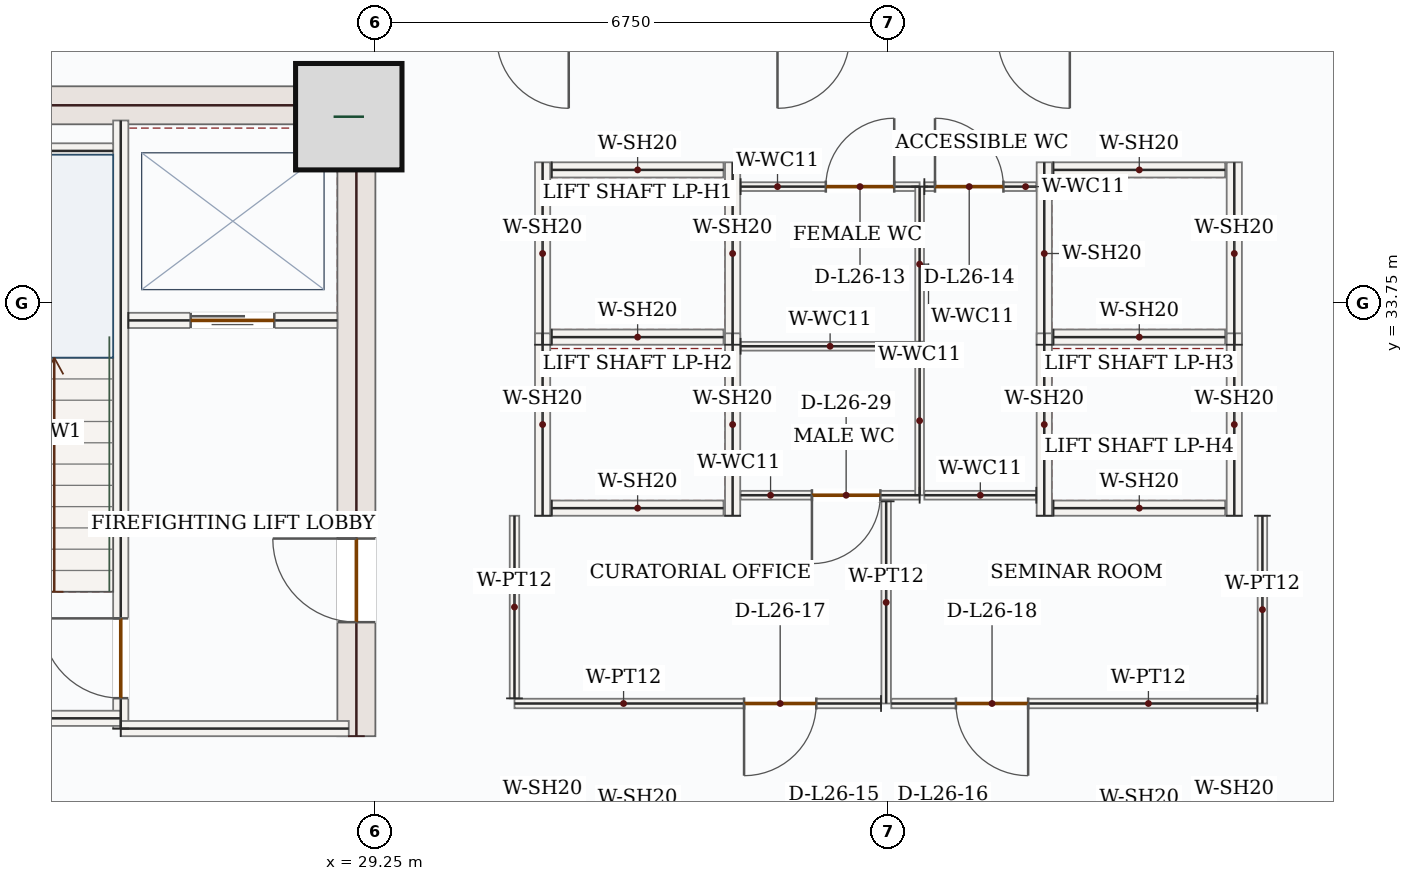
"""IFC4 building model, lengths in metres.
Left out: names, types, materials, properties, quantities, classifications, styles, units other than length and angle.
Written with IfcOpenShell. Run it as: python <this file> out.ifc"""

import sys

from ifc_helpers import new_model, si_unit, direction, frame, frame_2d, origin, origin_2d, place, context, subcontext, project, spatial, rectangle, extrude, source, transform, mapped, element, fill, save


model = new_model("IFC4")
c1 = context("Model", 3, precision=1e-05, world=origin(), true_north=direction((0.0, 1.0)))
c2 = subcontext(c1, "Body", "Model", "MODEL_VIEW")
j1 = project(units=[si_unit("LENGTHUNIT", "METRE"), si_unit("PLANEANGLEUNIT", "RADIAN")], contexts=[c1])
p1 = place(None, origin())
s1 = spatial("IfcSite", under=j1, at=p1, CompositionType="ELEMENT")
p2 = place(p1, origin())
s2 = spatial("IfcBuilding", under=s1, at=p2, CompositionType="ELEMENT")
p3 = place(p2, frame((0.0, 0.0, 117.3)))
s3 = spatial("IfcBuildingStorey", under=s2, at=p3, CompositionType="ELEMENT", Elevation=117.3)
p4 = place(p3, frame((29.0, 28.05, 0.0), z_axis=(0.0, 0.0, 1.0), x_axis=(0.0, 1.0, 0.0)))
e1 = element("IfcWall", 1, at=p4, inside=s3, PredefinedType="SHEAR", context=c2, shape_type="SweptSolid", body=[
    extrude(rectangle(XDim=8.55, YDim=0.5, at=frame_2d((4.275, 0.0))), origin(), (0.0, 0.0, 1.0), 3.95),
])
p5 = place(p4, frame((1.5, 0.0, 0.0)))
e2 = element("IfcOpeningElement", 2, at=p5, cuts=e1, PredefinedType="OPENING", context=c2, shape_type="SweptSolid", body=[
    extrude(rectangle(XDim=1.1, YDim=2.2, at=frame_2d((0.55, 1.1))), frame((0.0, 0.26, 0.0), z_axis=(0.0, -1.0, 0.0), x_axis=(1.0, 0.0, 0.0)), (0.0, 0.0, 1.0), 0.52),
])
m1 = source(origin(), c2, "Body", "SweptSolid", [
    extrude(rectangle(XDim=7.0, YDim=0.5, at=frame_2d((3.5, 0.0))), origin(), (0.0, 0.0, 1.0), 3.95),
])
p6 = place(p3, frame((21.75, 36.35, 0.0), z_axis=(0.0, 0.0, 1.0), x_axis=(1.0, 0.0, 0.0)))
e3 = element("IfcWall", 3, at=p6, inside=s3, PredefinedType="SHEAR", context=c2, shape_type="MappedRepresentation", body=[
    mapped(m1, transform((0.0, 0.0, 0.0), x_axis=(1.0, 0.0, 0.0), y_axis=(0.0, 1.0, 0.0), z_axis=(0.0, 0.0, 1.0), scale=1.0)),
])
m2 = source(origin(), c2, "Body", "SweptSolid", [
    extrude(rectangle(XDim=1.4, YDim=1.4, at=origin_2d()), origin(), (0.0, 0.0, 1.0), 4.2),
])
p7 = place(p3, frame((28.9, 36.2, 0.0), z_axis=(0.0, 0.0, 1.0), x_axis=(1.0, 0.0, 0.0)))
e4 = element("IfcColumn", 4, at=p7, inside=s3, PredefinedType="COLUMN", context=c2, shape_type="MappedRepresentation", body=[
    mapped(m2, transform((0.0, 0.0, 0.0), x_axis=(1.0, 0.0, 0.0), y_axis=(0.0, 1.0, 0.0), z_axis=(0.0, 0.0, 1.0), scale=1.0)),
])
p8 = place(p3, frame((25.9, 28.15, 0.0), z_axis=(0.0, 0.0, 1.0), x_axis=(0.0, 1.0, 0.0)))
e5 = element("IfcWall", 5, at=p8, inside=s3, PredefinedType="SOLIDWALL", context=c2, shape_type="SweptSolid", body=[
    extrude(rectangle(XDim=8.0, YDim=0.2, at=frame_2d((4.0, 0.0))), origin(), (0.0, 0.0, 1.0), 3.95),
])
p9 = place(p8, frame((0.4, 0.0, 0.0)))
e6 = element("IfcOpeningElement", 6, at=p9, cuts=e5, PredefinedType="OPENING", context=c2, shape_type="SweptSolid", body=[
    extrude(rectangle(XDim=1.05, YDim=2.15, at=frame_2d((0.525, 1.075))), frame((0.0, 0.11, 0.0), z_axis=(0.0, -1.0, 0.0), x_axis=(1.0, 0.0, 0.0)), (0.0, 0.0, 1.0), 0.22),
])
m3 = source(origin(), c2, "Body", "SweptSolid", [
    extrude(rectangle(XDim=4.25, YDim=0.2, at=frame_2d((2.125, 0.0))), origin(), (0.0, 0.0, 1.0), 3.95),
])
p10 = place(p3, frame((21.65, 28.285, 0.0), z_axis=(0.0, 0.0, 1.0), x_axis=(1.0, 0.0, 0.0)))
e7 = element("IfcWall", 7, at=p10, inside=s3, PredefinedType="SOLIDWALL", context=c2, shape_type="MappedRepresentation", body=[
    mapped(m3, transform((0.0, 0.0, 0.0), x_axis=(1.0, 0.0, 0.0), y_axis=(0.0, 1.0, 0.0), z_axis=(0.0, 0.0, 1.0), scale=1.0)),
])
m4 = source(origin(), c2, "Body", "SweptSolid", [
    extrude(rectangle(XDim=3.0, YDim=0.2, at=frame_2d((1.5, 0.0))), origin(), (0.0, 0.0, 1.0), 3.95),
])
p11 = place(p3, frame((25.9, 28.15, 0.0), z_axis=(0.0, 0.0, 1.0), x_axis=(1.0, 0.0, 0.0)))
e8 = element("IfcWall", 8, at=p11, inside=s3, PredefinedType="SOLIDWALL", context=c2, shape_type="MappedRepresentation", body=[
    mapped(m4, transform((0.0, 0.0, 0.0), x_axis=(1.0, 0.0, 0.0), y_axis=(0.0, 1.0, 0.0), z_axis=(0.0, 0.0, 1.0), scale=1.0)),
])
m5 = source(origin(), c2, "Body", "SweptSolid", [
    extrude(rectangle(XDim=3.25, YDim=0.2, at=frame_2d((1.625, 0.0))), origin(), (0.0, 0.0, 1.0), 3.95),
])
p12 = place(p3, frame((22.55, 35.75, 0.0), z_axis=(0.0, 0.0, 1.0), x_axis=(1.0, 0.0, 0.0)))
e9 = element("IfcWall", 9, at=p12, inside=s3, PredefinedType="SOLIDWALL", context=c2, shape_type="MappedRepresentation", body=[
    mapped(m5, transform((0.0, 0.0, 0.0), x_axis=(1.0, 0.0, 0.0), y_axis=(0.0, 1.0, 0.0), z_axis=(0.0, 0.0, 1.0), scale=1.0)),
])
p13 = place(p3, frame((26.0, 33.52, 0.0), z_axis=(0.0, 0.0, 1.0), x_axis=(1.0, 0.0, 0.0)))
e10 = element("IfcWall", 10, at=p13, inside=s3, PredefinedType="SOLIDWALL", context=c2, shape_type="SweptSolid", body=[
    extrude(rectangle(XDim=2.75, YDim=0.2, at=frame_2d((1.375, 0.0))), origin(), (0.0, 0.0, 1.0), 3.95),
])
p14 = place(p13, frame((0.82, 0.0, 0.0)))
e11 = element("IfcOpeningElement", 11, at=p14, cuts=e10, PredefinedType="OPENING", context=c2, shape_type="SweptSolid", body=[
    extrude(rectangle(XDim=1.1, YDim=2.15, at=frame_2d((0.55, 1.075))), frame((0.0, 0.11, 0.0), z_axis=(0.0, -1.0, 0.0), x_axis=(1.0, 0.0, 0.0)), (0.0, 0.0, 1.0), 0.22),
])
m6 = source(origin(), c2, "Body", "SweptSolid", [
    extrude(rectangle(XDim=2.4, YDim=0.2, at=frame_2d((1.2, 0.0))), origin(), (0.0, 0.0, 1.0), 3.95),
])
for number, where, z_axis, x_axis in (
    (12, (31.45, 33.2, 0.0), (0.0, 0.0, 1.0), (0.0, 1.0, 0.0)),
    (13, (33.95, 33.2, 0.0), (0.0, 0.0, 1.0), (0.0, 1.0, 0.0)),
):
    element("IfcWall", number, at=place(p3, frame(where, z_axis=z_axis, x_axis=x_axis)), inside=s3, PredefinedType="SOLIDWALL", context=c2, shape_type="MappedRepresentation", body=[
        mapped(m6, transform((0.0, 0.0, 0.0), x_axis=(1.0, 0.0, 0.0), y_axis=(0.0, 1.0, 0.0), z_axis=(0.0, 0.0, 1.0), scale=1.0)),
    ])
m7 = source(origin(), c2, "Body", "SweptSolid", [
    extrude(rectangle(XDim=2.26, YDim=0.2, at=frame_2d((1.13, 0.0))), origin(), (0.0, 0.0, 1.0), 3.95),
])
for number, where, z_axis, x_axis in (
    (14, (31.57, 33.3, 0.0), (0.0, 0.0, 1.0), (1.0, 0.0, 0.0)),
    (15, (31.57, 35.5, 0.0), (0.0, 0.0, 1.0), (1.0, 0.0, 0.0)),
):
    element("IfcWall", number, at=place(p3, frame(where, z_axis=z_axis, x_axis=x_axis)), inside=s3, PredefinedType="SOLIDWALL", context=c2, shape_type="MappedRepresentation", body=[
        mapped(m7, transform((0.0, 0.0, 0.0), x_axis=(1.0, 0.0, 0.0), y_axis=(0.0, 1.0, 0.0), z_axis=(0.0, 0.0, 1.0), scale=1.0)),
    ])
for number, where, z_axis, x_axis in (
    (16, (31.45, 30.95, 0.0), (0.0, 0.0, 1.0), (0.0, 1.0, 0.0)),
    (17, (33.95, 30.95, 0.0), (0.0, 0.0, 1.0), (0.0, 1.0, 0.0)),
):
    element("IfcWall", number, at=place(p3, frame(where, z_axis=z_axis, x_axis=x_axis)), inside=s3, PredefinedType="SOLIDWALL", context=c2, shape_type="MappedRepresentation", body=[
        mapped(m6, transform((0.0, 0.0, 0.0), x_axis=(1.0, 0.0, 0.0), y_axis=(0.0, 1.0, 0.0), z_axis=(0.0, 0.0, 1.0), scale=1.0)),
    ])
p15 = place(p3, frame((31.57, 31.05, 0.0), z_axis=(0.0, 0.0, 1.0), x_axis=(1.0, 0.0, 0.0)))
e18 = element("IfcWall", 18, at=p15, inside=s3, PredefinedType="SOLIDWALL", context=c2, shape_type="MappedRepresentation", body=[
    mapped(m7, transform((0.0, 0.0, 0.0), x_axis=(1.0, 0.0, 0.0), y_axis=(0.0, 1.0, 0.0), z_axis=(0.0, 0.0, 1.0), scale=1.0)),
])
for number, where, z_axis, x_axis in (
    (19, (38.05, 33.2, 0.0), (0.0, 0.0, 1.0), (0.0, 1.0, 0.0)),
    (20, (40.55, 33.2, 0.0), (0.0, 0.0, 1.0), (0.0, 1.0, 0.0)),
):
    element("IfcWall", number, at=place(p3, frame(where, z_axis=z_axis, x_axis=x_axis)), inside=s3, PredefinedType="SOLIDWALL", context=c2, shape_type="MappedRepresentation", body=[
        mapped(m6, transform((0.0, 0.0, 0.0), x_axis=(1.0, 0.0, 0.0), y_axis=(0.0, 1.0, 0.0), z_axis=(0.0, 0.0, 1.0), scale=1.0)),
    ])
for number, where, z_axis, x_axis in (
    (21, (38.17, 33.3, 0.0), (0.0, 0.0, 1.0), (1.0, 0.0, 0.0)),
    (22, (38.17, 35.5, 0.0), (0.0, 0.0, 1.0), (1.0, 0.0, 0.0)),
):
    element("IfcWall", number, at=place(p3, frame(where, z_axis=z_axis, x_axis=x_axis)), inside=s3, PredefinedType="SOLIDWALL", context=c2, shape_type="MappedRepresentation", body=[
        mapped(m7, transform((0.0, 0.0, 0.0), x_axis=(1.0, 0.0, 0.0), y_axis=(0.0, 1.0, 0.0), z_axis=(0.0, 0.0, 1.0), scale=1.0)),
    ])
for number, where, z_axis, x_axis in (
    (23, (38.05, 30.95, 0.0), (0.0, 0.0, 1.0), (0.0, 1.0, 0.0)),
    (24, (40.55, 30.95, 0.0), (0.0, 0.0, 1.0), (0.0, 1.0, 0.0)),
):
    element("IfcWall", number, at=place(p3, frame(where, z_axis=z_axis, x_axis=x_axis)), inside=s3, PredefinedType="SOLIDWALL", context=c2, shape_type="MappedRepresentation", body=[
        mapped(m6, transform((0.0, 0.0, 0.0), x_axis=(1.0, 0.0, 0.0), y_axis=(0.0, 1.0, 0.0), z_axis=(0.0, 0.0, 1.0), scale=1.0)),
    ])
p16 = place(p3, frame((38.17, 31.05, 0.0), z_axis=(0.0, 0.0, 1.0), x_axis=(1.0, 0.0, 0.0)))
e25 = element("IfcWall", 25, at=p16, inside=s3, PredefinedType="SOLIDWALL", context=c2, shape_type="MappedRepresentation", body=[
    mapped(m7, transform((0.0, 0.0, 0.0), x_axis=(1.0, 0.0, 0.0), y_axis=(0.0, 1.0, 0.0), z_axis=(0.0, 0.0, 1.0), scale=1.0)),
])
p17 = place(p3, frame((36.41, 31.22, 0.0), z_axis=(0.0, 0.0, 1.0), x_axis=(-1.0, 0.0, 0.0)))
e26 = element("IfcWall", 26, at=p17, inside=s3, PredefinedType="PARTITIONING", context=c2, shape_type="SweptSolid", body=[
    extrude(rectangle(XDim=2.355, YDim=0.115, at=frame_2d((1.177, 0.0))), origin(), (0.0, 0.0, 1.0), 3.95),
])
p18 = place(p17, frame((0.517, 0.0, 0.0)))
e27 = element("IfcOpeningElement", 27, at=p18, cuts=e26, PredefinedType="OPENING", context=c2, shape_type="SweptSolid", body=[
    extrude(rectangle(XDim=0.9, YDim=2.1, at=frame_2d((0.45, 1.05))), frame((0.0, 0.067, 0.0), z_axis=(0.0, -1.0, 0.0), x_axis=(1.0, 0.0, 0.0)), (0.0, 0.0, 1.0), 0.135),
])
m8 = source(origin(), c2, "Body", "SweptSolid", [
    extrude(rectangle(XDim=2.355, YDim=0.115, at=frame_2d((1.177, 0.0))), origin(), (0.0, 0.0, 1.0), 3.95),
])
p19 = place(p3, frame((34.055, 33.18, 0.0), z_axis=(0.0, 0.0, 1.0), x_axis=(1.0, 0.0, 0.0)))
e28 = element("IfcWall", 28, at=p19, inside=s3, PredefinedType="PARTITIONING", context=c2, shape_type="MappedRepresentation", body=[
    mapped(m8, transform((0.0, 0.0, 0.0), x_axis=(1.0, 0.0, 0.0), y_axis=(0.0, 1.0, 0.0), z_axis=(0.0, 0.0, 1.0), scale=1.0)),
])
m9 = source(origin(), c2, "Body", "SweptSolid", [
    extrude(rectangle(XDim=1.96, YDim=0.115, at=frame_2d((0.98, 0.0))), origin(), (0.0, 0.0, 1.0), 3.95),
])
p20 = place(p3, frame((36.41, 33.18, 0.0), z_axis=(0.0, 0.0, 1.0), x_axis=(0.0, -1.0, 0.0)))
e29 = element("IfcWall", 29, at=p20, inside=s3, PredefinedType="PARTITIONING", context=c2, shape_type="MappedRepresentation", body=[
    mapped(m9, transform((0.0, 0.0, 0.0), x_axis=(1.0, 0.0, 0.0), y_axis=(0.0, 1.0, 0.0), z_axis=(0.0, 0.0, 1.0), scale=1.0)),
])
p21 = place(p3, frame((34.055, 35.28, 0.0), z_axis=(0.0, 0.0, 1.0), x_axis=(1.0, 0.0, 0.0)))
e30 = element("IfcWall", 30, at=p21, inside=s3, PredefinedType="PARTITIONING", context=c2, shape_type="SweptSolid", body=[
    extrude(rectangle(XDim=2.355, YDim=0.115, at=frame_2d((1.177, 0.0))), origin(), (0.0, 0.0, 1.0), 3.95),
])
p22 = place(p21, frame((1.121, 0.0, 0.0)))
e31 = element("IfcOpeningElement", 31, at=p22, cuts=e30, PredefinedType="OPENING", context=c2, shape_type="SweptSolid", body=[
    extrude(rectangle(XDim=0.9, YDim=2.1, at=frame_2d((0.45, 1.05))), frame((0.0, 0.067, 0.0), z_axis=(0.0, -1.0, 0.0), x_axis=(1.0, 0.0, 0.0)), (0.0, 0.0, 1.0), 0.135),
])
m10 = source(origin(), c2, "Body", "SweptSolid", [
    extrude(rectangle(XDim=2.04, YDim=0.115, at=frame_2d((1.02, 0.0))), origin(), (0.0, 0.0, 1.0), 3.95),
])
p23 = place(p3, frame((36.41, 35.28, 0.0), z_axis=(0.0, 0.0, 1.0), x_axis=(0.0, -1.0, 0.0)))
e32 = element("IfcWall", 32, at=p23, inside=s3, PredefinedType="PARTITIONING", context=c2, shape_type="MappedRepresentation", body=[
    mapped(m10, transform((0.0, 0.0, 0.0), x_axis=(1.0, 0.0, 0.0), y_axis=(0.0, 1.0, 0.0), z_axis=(0.0, 0.0, 1.0), scale=1.0)),
])
m11 = source(origin(), c2, "Body", "SweptSolid", [
    extrude(rectangle(XDim=1.473, YDim=0.115, at=frame_2d((0.736, 0.0))), origin(), (0.0, 0.0, 1.0), 3.95),
])
p24 = place(p3, frame((37.945, 31.22, 0.0), z_axis=(0.0, 0.0, 1.0), x_axis=(-1.0, 0.0, 0.0)))
e33 = element("IfcWall", 33, at=p24, inside=s3, PredefinedType="PARTITIONING", context=c2, shape_type="MappedRepresentation", body=[
    mapped(m11, transform((0.0, 0.0, 0.0), x_axis=(1.0, 0.0, 0.0), y_axis=(0.0, 1.0, 0.0), z_axis=(0.0, 0.0, 1.0), scale=1.0)),
])
p25 = place(p3, frame((36.472, 35.28, 0.0), z_axis=(0.0, 0.0, 1.0), x_axis=(1.0, 0.0, 0.0)))
e34 = element("IfcWall", 34, at=p25, inside=s3, PredefinedType="PARTITIONING", context=c2, shape_type="SweptSolid", body=[
    extrude(rectangle(XDim=1.473, YDim=0.115, at=frame_2d((0.736, 0.0))), origin(), (0.0, 0.0, 1.0), 3.95),
])
p26 = place(p25, frame((0.14, 0.0, 0.0)))
e35 = element("IfcOpeningElement", 35, at=p26, cuts=e34, PredefinedType="OPENING", context=c2, shape_type="SweptSolid", body=[
    extrude(rectangle(XDim=0.9, YDim=2.1, at=frame_2d((0.45, 1.05))), frame((0.0, 0.067, 0.0), z_axis=(0.0, -1.0, 0.0), x_axis=(1.0, 0.0, 0.0)), (0.0, 0.0, 1.0), 0.135),
])
m12 = source(origin(), c2, "Body", "SweptSolid", [
    extrude(rectangle(XDim=2.66, YDim=0.125, at=frame_2d((1.33, 0.0))), origin(), (0.0, 0.0, 1.0), 3.95),
])
p27 = place(p3, frame((35.97, 31.14, 0.0), z_axis=(0.0, 0.0, 1.0), x_axis=(0.0, -1.0, 0.0)))
e36 = element("IfcWall", 36, at=p27, inside=s3, PredefinedType="PARTITIONING", context=c2, shape_type="MappedRepresentation", body=[
    mapped(m12, transform((0.0, 0.0, 0.0), x_axis=(1.0, 0.0, 0.0), y_axis=(0.0, 1.0, 0.0), z_axis=(0.0, 0.0, 1.0), scale=1.0)),
])
p28 = place(p3, frame((35.903, 28.48, 0.0), z_axis=(0.0, 0.0, 1.0), x_axis=(-1.0, 0.0, 0.0)))
e37 = element("IfcWall", 37, at=p28, inside=s3, PredefinedType="PARTITIONING", context=c2, shape_type="SweptSolid", body=[
    extrude(rectangle(XDim=4.823, YDim=0.125, at=frame_2d((2.411, 0.0))), origin(), (0.0, 0.0, 1.0), 3.95),
])
p29 = place(p28, frame((0.852, 0.0, 0.0)))
e38 = element("IfcOpeningElement", 38, at=p29, cuts=e37, PredefinedType="OPENING", context=c2, shape_type="SweptSolid", body=[
    extrude(rectangle(XDim=0.95, YDim=2.15, at=frame_2d((0.475, 1.075))), frame((0.0, 0.073, 0.0), z_axis=(0.0, -1.0, 0.0), x_axis=(1.0, 0.0, 0.0)), (0.0, 0.0, 1.0), 0.145),
])
m13 = source(origin(), c2, "Body", "SweptSolid", [
    extrude(rectangle(XDim=2.402, YDim=0.125, at=frame_2d((1.201, 0.0))), origin(), (0.0, 0.0, 1.0), 3.95),
])
p30 = place(p3, frame((31.08, 28.548, 0.0), z_axis=(0.0, 0.0, 1.0), x_axis=(0.0, 1.0, 0.0)))
e39 = element("IfcWall", 39, at=p30, inside=s3, PredefinedType="PARTITIONING", context=c2, shape_type="MappedRepresentation", body=[
    mapped(m13, transform((0.0, 0.0, 0.0), x_axis=(1.0, 0.0, 0.0), y_axis=(0.0, 1.0, 0.0), z_axis=(0.0, 0.0, 1.0), scale=1.0)),
])
m14 = source(origin(), c2, "Body", "SweptSolid", [
    extrude(rectangle(XDim=2.47, YDim=0.125, at=frame_2d((1.235, 0.0))), origin(), (0.0, 0.0, 1.0), 3.95),
])
p31 = place(p3, frame((40.92, 30.95, 0.0), z_axis=(0.0, 0.0, 1.0), x_axis=(0.0, -1.0, 0.0)))
e40 = element("IfcWall", 40, at=p31, inside=s3, PredefinedType="PARTITIONING", context=c2, shape_type="MappedRepresentation", body=[
    mapped(m14, transform((0.0, 0.0, 0.0), x_axis=(1.0, 0.0, 0.0), y_axis=(0.0, 1.0, 0.0), z_axis=(0.0, 0.0, 1.0), scale=1.0)),
])
p32 = place(p3, frame((40.853, 28.48, 0.0), z_axis=(0.0, 0.0, 1.0), x_axis=(-1.0, 0.0, 0.0)))
e41 = element("IfcWall", 41, at=p32, inside=s3, PredefinedType="PARTITIONING", context=c2, shape_type="SweptSolid", body=[
    extrude(rectangle(XDim=4.815, YDim=0.125, at=frame_2d((2.407, 0.0))), origin(), (0.0, 0.0, 1.0), 3.95),
])
p33 = place(p32, frame((3.015, 0.0, 0.0)))
e42 = element("IfcOpeningElement", 42, at=p33, cuts=e41, PredefinedType="OPENING", context=c2, shape_type="SweptSolid", body=[
    extrude(rectangle(XDim=0.95, YDim=2.15, at=frame_2d((0.475, 1.075))), frame((0.0, 0.073, 0.0), z_axis=(0.0, -1.0, 0.0), x_axis=(1.0, 0.0, 0.0)), (0.0, 0.0, 1.0), 0.145),
])
m15 = source(origin(), c2, "Body", "SweptSolid", [
    extrude(rectangle(XDim=1.05, YDim=2.15, at=frame_2d((0.525, 1.075))), frame((0.0, 0.025, 0.0), z_axis=(0.0, -1.0, 0.0), x_axis=(1.0, 0.0, 0.0)), (0.0, 0.0, 1.0), 0.05),
])
p34 = place(p9, origin())
e43 = element("IfcDoor", 43, at=p34, inside=s3, OperationType="SINGLE_SWING_RIGHT", PredefinedType="DOOR", context=c2, shape_type="MappedRepresentation", body=[
    mapped(m15, transform((0.0, 0.0, 0.0), x_axis=(1.0, 0.0, 0.0), y_axis=(0.0, 1.0, 0.0), z_axis=(0.0, 0.0, 1.0), scale=1.0)),
])
fill(e6, e43)
m16 = source(origin(), c2, "Body", "SweptSolid", [
    extrude(rectangle(XDim=1.1, YDim=2.15, at=frame_2d((0.55, 1.075))), frame((0.0, 0.025, 0.0), z_axis=(0.0, -1.0, 0.0), x_axis=(1.0, 0.0, 0.0)), (0.0, 0.0, 1.0), 0.05),
])
p35 = place(p14, origin())
e44 = element("IfcDoor", 44, at=p35, inside=s3, OperationType="DOUBLE_DOOR_SLIDING", PredefinedType="DOOR", context=c2, shape_type="MappedRepresentation", body=[
    mapped(m16, transform((0.0, 0.0, 0.0), x_axis=(1.0, 0.0, 0.0), y_axis=(0.0, 1.0, 0.0), z_axis=(0.0, 0.0, 1.0), scale=1.0)),
])
fill(e11, e44)
m17 = source(origin(), c2, "Body", "SweptSolid", [
    extrude(rectangle(XDim=1.1, YDim=2.2, at=frame_2d((0.55, 1.1))), frame((0.0, 0.025, 0.0), z_axis=(0.0, -1.0, 0.0), x_axis=(1.0, 0.0, 0.0)), (0.0, 0.0, 1.0), 0.05),
])
p36 = place(p5, origin())
e45 = element("IfcDoor", 45, at=p36, inside=s3, OperationType="SINGLE_SWING_RIGHT", PredefinedType="DOOR", context=c2, shape_type="MappedRepresentation", body=[
    mapped(m17, transform((0.0, 0.0, 0.0), x_axis=(1.0, 0.0, 0.0), y_axis=(0.0, 1.0, 0.0), z_axis=(0.0, 0.0, 1.0), scale=1.0)),
])
fill(e2, e45)
m18 = source(origin(), c2, "Body", "SweptSolid", [
    extrude(rectangle(XDim=0.9, YDim=2.1, at=frame_2d((0.45, 1.05))), frame((0.0, 0.025, 0.0), z_axis=(0.0, -1.0, 0.0), x_axis=(1.0, 0.0, 0.0)), (0.0, 0.0, 1.0), 0.05),
])
p37 = place(p22, origin())
e46 = element("IfcDoor", 46, at=p37, inside=s3, OperationType="SINGLE_SWING_RIGHT", PredefinedType="DOOR", context=c2, shape_type="MappedRepresentation", body=[
    mapped(m18, transform((0.0, 0.0, 0.0), x_axis=(1.0, 0.0, 0.0), y_axis=(0.0, 1.0, 0.0), z_axis=(0.0, 0.0, 1.0), scale=1.0)),
])
fill(e31, e46)
p38 = place(p26, origin())
e47 = element("IfcDoor", 47, at=p38, inside=s3, OperationType="SINGLE_SWING_LEFT", PredefinedType="DOOR", context=c2, shape_type="MappedRepresentation", body=[
    mapped(m18, transform((0.0, 0.0, 0.0), x_axis=(1.0, 0.0, 0.0), y_axis=(0.0, 1.0, 0.0), z_axis=(0.0, 0.0, 1.0), scale=1.0)),
])
fill(e35, e47)
m19 = source(origin(), c2, "Body", "SweptSolid", [
    extrude(rectangle(XDim=0.95, YDim=2.15, at=frame_2d((0.475, 1.075))), frame((0.0, 0.025, 0.0), z_axis=(0.0, -1.0, 0.0), x_axis=(1.0, 0.0, 0.0)), (0.0, 0.0, 1.0), 0.05),
])
p39 = place(p29, origin())
e48 = element("IfcDoor", 48, at=p39, inside=s3, OperationType="SINGLE_SWING_RIGHT", PredefinedType="DOOR", context=c2, shape_type="MappedRepresentation", body=[
    mapped(m19, transform((0.0, 0.0, 0.0), x_axis=(1.0, 0.0, 0.0), y_axis=(0.0, 1.0, 0.0), z_axis=(0.0, 0.0, 1.0), scale=1.0)),
])
fill(e38, e48)
p40 = place(p33, origin())
e49 = element("IfcDoor", 49, at=p40, inside=s3, OperationType="SINGLE_SWING_LEFT", PredefinedType="DOOR", context=c2, shape_type="MappedRepresentation", body=[
    mapped(m19, transform((0.0, 0.0, 0.0), x_axis=(1.0, 0.0, 0.0), y_axis=(0.0, 1.0, 0.0), z_axis=(0.0, 0.0, 1.0), scale=1.0)),
])
fill(e42, e49)
p41 = place(p18, origin())
e50 = element("IfcDoor", 50, at=p41, inside=s3, OperationType="SINGLE_SWING_RIGHT", PredefinedType="DOOR", context=c2, shape_type="MappedRepresentation", body=[
    mapped(m18, transform((0.0, 0.0, 0.0), x_axis=(1.0, 0.0, 0.0), y_axis=(0.0, 1.0, 0.0), z_axis=(0.0, 0.0, 1.0), scale=1.0)),
])
fill(e27, e50)
save(model, sys.argv[1])
